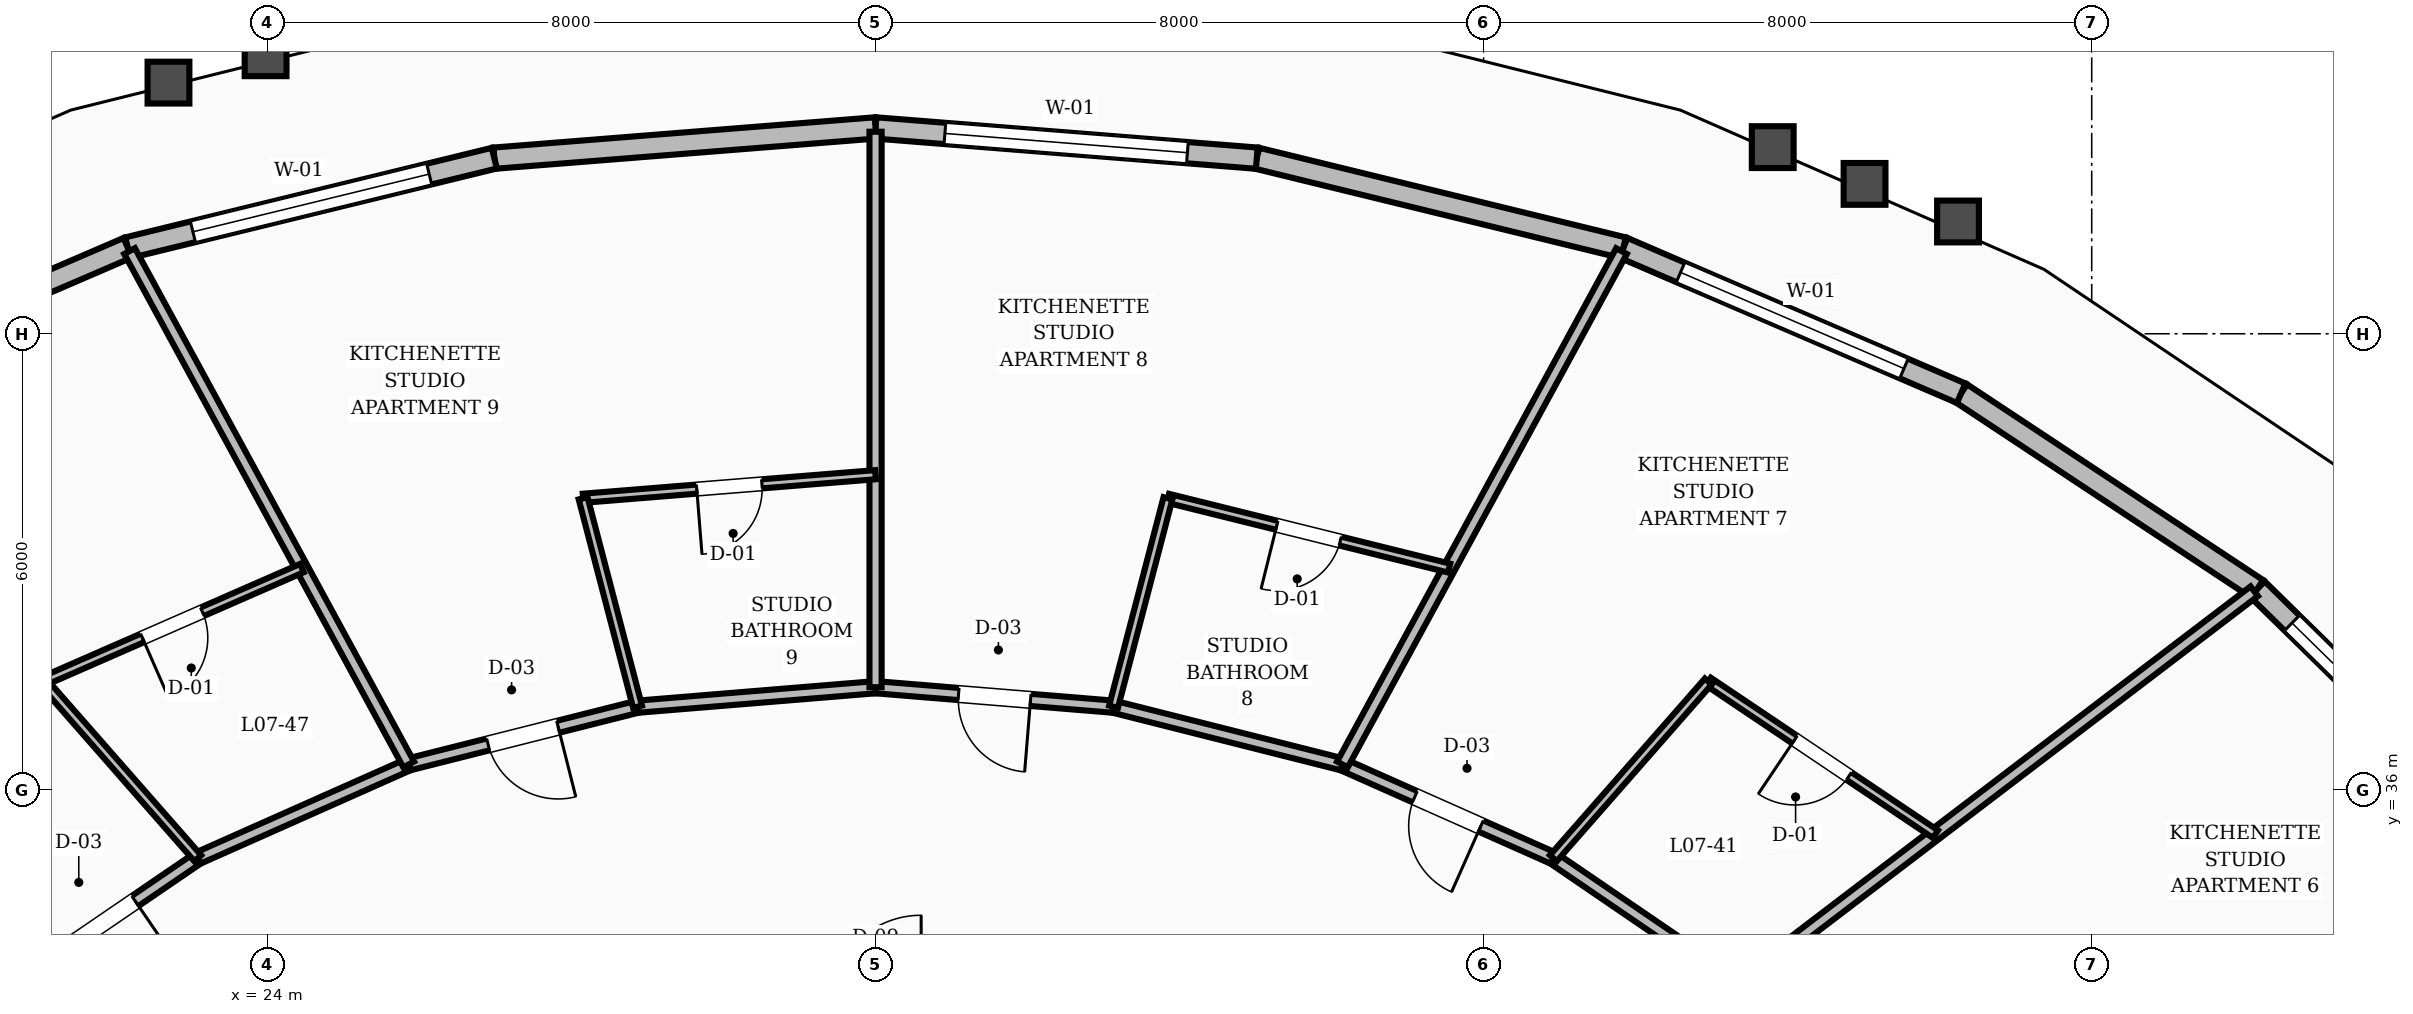
"""IFC4 building model, lengths in metres.
Left out: names, types, materials, properties, quantities, classifications, styles, units other than length and angle.
Written with IfcOpenShell. Run it as: python <this file> out.ifc"""

import sys

from ifc_helpers import new_model, si_unit, direction, frame, frame_2d, origin, place, context, subcontext, project, spatial, rectangle, extrude, element, fill, save


model = new_model("IFC4")
c1 = context("Model", 3, precision=1e-05, world=origin(), true_north=direction((0.0, 1.0)))
c2 = subcontext(c1, "Body", "Model", "MODEL_VIEW")
j1 = project(units=[si_unit("LENGTHUNIT", "METRE"), si_unit("PLANEANGLEUNIT", "RADIAN")], contexts=[c1])
p1 = place(None, origin())
s1 = spatial("IfcSite", under=j1, at=p1, CompositionType="ELEMENT")
p2 = place(p1, origin())
s2 = spatial("IfcBuilding", under=s1, at=p2, CompositionType="ELEMENT")
p3 = place(p2, frame((0.0, 0.0, 34.0)))
s3 = spatial("IfcBuildingStorey", under=s2, at=p3, CompositionType="ELEMENT", Elevation=34.0)
p4 = place(p3, frame((53.375, 35.505, 0.0), z_axis=(0.0, 0.0, 1.0), x_axis=(-0.713670465871, 0.700481595864, 0.0)))
e1 = element("IfcWall", 1, at=p4, inside=s3, PredefinedType="STANDARD", context=c2, shape_type="SweptSolid", body=[
    extrude(rectangle(XDim=4.48, YDim=0.28, at=frame_2d((2.24, 0.0))), origin(), (0.0, 0.0, 1.0), 2.65),
])
p5 = place(p4, frame((0.64, 0.0, 0.8)))
e2 = element("IfcOpeningElement", 2, at=p5, cuts=e1, PredefinedType="OPENING", context=c2, shape_type="SweptSolid", body=[
    extrude(rectangle(XDim=3.2, YDim=1.65, at=frame_2d((1.6, 0.825))), frame((0.0, 0.15, 0.0), z_axis=(0.0, -1.0, 0.0), x_axis=(1.0, 0.0, 0.0)), (0.0, 0.0, 1.0), 0.3),
])
p6 = place(p3, frame((50.178, 38.643, 0.0), z_axis=(0.0, 0.0, 1.0), x_axis=(-0.834191456714, 0.551474943716, 0.0)))
e3 = element("IfcWall", 3, at=p6, inside=s3, PredefinedType="STANDARD", context=c2, shape_type="SweptSolid", body=[
    extrude(rectangle(XDim=4.67, YDim=0.28, at=frame_2d((2.335, 0.0))), origin(), (0.0, 0.0, 1.0), 2.65),
])
p7 = place(p3, frame((46.282, 41.218, 0.0), z_axis=(0.0, 0.0, 1.0), x_axis=(-0.918488745996, 0.395447118435, 0.0)))
e4 = element("IfcWall", 4, at=p7, inside=s3, PredefinedType="STANDARD", context=c2, shape_type="SweptSolid", body=[
    extrude(rectangle(XDim=4.839, YDim=0.28, at=frame_2d((2.419, 0.0))), origin(), (0.0, 0.0, 1.0), 2.65),
])
p8 = place(p7, frame((0.82, 0.0, 0.8)))
e5 = element("IfcOpeningElement", 5, at=p8, cuts=e4, PredefinedType="OPENING", context=c2, shape_type="SweptSolid", body=[
    extrude(rectangle(XDim=3.2, YDim=1.65, at=frame_2d((1.6, 0.825))), frame((0.0, 0.15, 0.0), z_axis=(0.0, -1.0, 0.0), x_axis=(1.0, 0.0, 0.0)), (0.0, 0.0, 1.0), 0.3),
])
p9 = place(p3, frame((41.838, 43.132, 0.0), z_axis=(0.0, 0.0, 1.0), x_axis=(-0.971416145281, 0.237382966297, 0.0)))
e6 = element("IfcWall", 6, at=p9, inside=s3, PredefinedType="STANDARD", context=c2, shape_type="SweptSolid", body=[
    extrude(rectangle(XDim=4.964, YDim=0.28, at=frame_2d((2.482, 0.0))), origin(), (0.0, 0.0, 1.0), 2.65),
])
p10 = place(p3, frame((37.015, 44.31, 0.0), z_axis=(0.0, 0.0, 1.0), x_axis=(-0.996866911104, 0.079097165219, 0.0)))
e7 = element("IfcWall", 7, at=p10, inside=s3, PredefinedType="STANDARD", context=c2, shape_type="SweptSolid", body=[
    extrude(rectangle(XDim=5.031, YDim=0.28, at=frame_2d((2.516, 0.0))), origin(), (0.0, 0.0, 1.0), 2.65),
])
p11 = place(p10, frame((0.916, 0.0, 0.8)))
e8 = element("IfcOpeningElement", 8, at=p11, cuts=e7, PredefinedType="OPENING", context=c2, shape_type="SweptSolid", body=[
    extrude(rectangle(XDim=3.2, YDim=1.65, at=frame_2d((1.6, 0.825))), frame((0.0, 0.15, 0.0), z_axis=(0.0, -1.0, 0.0), x_axis=(1.0, 0.0, 0.0)), (0.0, 0.0, 1.0), 0.3),
])
p12 = place(p3, frame((32.0, 44.708, 0.0), z_axis=(0.0, 0.0, 1.0), x_axis=(-0.996866911104, -0.079097165219, 0.0)))
e9 = element("IfcWall", 9, at=p12, inside=s3, PredefinedType="STANDARD", context=c2, shape_type="SweptSolid", body=[
    extrude(rectangle(XDim=5.031, YDim=0.28, at=frame_2d((2.516, 0.0))), origin(), (0.0, 0.0, 1.0), 2.65),
])
p13 = place(p3, frame((26.985, 44.31, 0.0), z_axis=(0.0, 0.0, 1.0), x_axis=(-0.971416145281, -0.237382966297, 0.0)))
e10 = element("IfcWall", 10, at=p13, inside=s3, PredefinedType="STANDARD", context=c2, shape_type="SweptSolid", body=[
    extrude(rectangle(XDim=4.964, YDim=0.28, at=frame_2d((2.482, 0.0))), origin(), (0.0, 0.0, 1.0), 2.65),
])
p14 = place(p13, frame((0.882, 0.0, 0.8)))
e11 = element("IfcOpeningElement", 11, at=p14, cuts=e10, PredefinedType="OPENING", context=c2, shape_type="SweptSolid", body=[
    extrude(rectangle(XDim=3.2, YDim=1.65, at=frame_2d((1.6, 0.825))), frame((0.0, 0.15, 0.0), z_axis=(0.0, -1.0, 0.0), x_axis=(1.0, 0.0, 0.0)), (0.0, 0.0, 1.0), 0.3),
])
p15 = place(p3, frame((22.162, 43.132, 0.0), z_axis=(0.0, 0.0, 1.0), x_axis=(-0.918488745996, -0.395447118435, 0.0)))
e12 = element("IfcWall", 12, at=p15, inside=s3, PredefinedType="STANDARD", context=c2, shape_type="SweptSolid", body=[
    extrude(rectangle(XDim=4.839, YDim=0.28, at=frame_2d((2.419, 0.0))), origin(), (0.0, 0.0, 1.0), 2.65),
])
p16 = place(p3, frame((43.349, 33.44, 0.0), z_axis=(0.0, 0.0, 1.0), x_axis=(-0.825929039072, 0.563774088104, 0.0)))
e13 = element("IfcWall", 13, at=p16, inside=s3, PredefinedType="SOLIDWALL", context=c2, shape_type="SweptSolid", body=[
    extrude(rectangle(XDim=2.945, YDim=0.16, at=frame_2d((1.472, 0.0))), origin(), (0.0, 0.0, 1.0), 2.61),
])
p17 = place(p3, frame((40.917, 35.1, 0.0), z_axis=(0.0, 0.0, 1.0), x_axis=(-0.913768445178, 0.406235434936, 0.0)))
e14 = element("IfcWall", 14, at=p17, inside=s3, PredefinedType="SOLIDWALL", context=c2, shape_type="SweptSolid", body=[
    extrude(rectangle(XDim=3.037, YDim=0.16, at=frame_2d((1.519, 0.0))), origin(), (0.0, 0.0, 1.0), 2.61),
])
p18 = place(p17, frame((1.043, 0.0, 0.0)))
e15 = element("IfcOpeningElement", 15, at=p18, cuts=e14, PredefinedType="OPENING", context=c2, shape_type="SweptSolid", body=[
    extrude(rectangle(XDim=0.95, YDim=2.1, at=frame_2d((0.475, 1.05))), frame((0.0, 0.09, 0.0), z_axis=(0.0, -1.0, 0.0), x_axis=(1.0, 0.0, 0.0)), (0.0, 0.0, 1.0), 0.18),
])
p19 = place(p3, frame((38.142, 36.334, 0.0), z_axis=(0.0, 0.0, 1.0), x_axis=(-0.969608333194, 0.244662380029, 0.0)))
e16 = element("IfcWall", 16, at=p19, inside=s3, PredefinedType="SOLIDWALL", context=c2, shape_type="SweptSolid", body=[
    extrude(rectangle(XDim=3.105, YDim=0.16, at=frame_2d((1.553, 0.0))), origin(), (0.0, 0.0, 1.0), 2.61),
])
p20 = place(p3, frame((35.131, 37.094, 0.0), z_axis=(0.0, 0.0, 1.0), x_axis=(-0.996658973252, 0.081675522876, 0.0)))
e17 = element("IfcWall", 17, at=p20, inside=s3, PredefinedType="SOLIDWALL", context=c2, shape_type="SweptSolid", body=[
    extrude(rectangle(XDim=3.142, YDim=0.16, at=frame_2d((1.571, 0.0))), origin(), (0.0, 0.0, 1.0), 2.61),
])
p21 = place(p20, frame((1.096, 0.0, 0.0)))
e18 = element("IfcOpeningElement", 18, at=p21, cuts=e17, PredefinedType="OPENING", context=c2, shape_type="SweptSolid", body=[
    extrude(rectangle(XDim=0.95, YDim=2.1, at=frame_2d((0.475, 1.05))), frame((0.0, 0.09, 0.0), z_axis=(0.0, -1.0, 0.0), x_axis=(1.0, 0.0, 0.0)), (0.0, 0.0, 1.0), 0.18),
])
p22 = place(p3, frame((32.0, 37.35, 0.0), z_axis=(0.0, 0.0, 1.0), x_axis=(-0.996658973252, -0.081675522876, 0.0)))
e19 = element("IfcWall", 19, at=p22, inside=s3, PredefinedType="SOLIDWALL", context=c2, shape_type="SweptSolid", body=[
    extrude(rectangle(XDim=3.142, YDim=0.16, at=frame_2d((1.571, 0.0))), origin(), (0.0, 0.0, 1.0), 2.61),
])
p23 = place(p3, frame((28.869, 37.094, 0.0), z_axis=(0.0, 0.0, 1.0), x_axis=(-0.969608333194, -0.244662380029, 0.0)))
e20 = element("IfcWall", 20, at=p23, inside=s3, PredefinedType="SOLIDWALL", context=c2, shape_type="SweptSolid", body=[
    extrude(rectangle(XDim=3.105, YDim=0.16, at=frame_2d((1.553, 0.0))), origin(), (0.0, 0.0, 1.0), 2.61),
])
p24 = place(p23, frame((1.078, 0.0, 0.0)))
e21 = element("IfcOpeningElement", 21, at=p24, cuts=e20, PredefinedType="OPENING", context=c2, shape_type="SweptSolid", body=[
    extrude(rectangle(XDim=0.95, YDim=2.1, at=frame_2d((0.475, 1.05))), frame((0.0, 0.09, 0.0), z_axis=(0.0, -1.0, 0.0), x_axis=(1.0, 0.0, 0.0)), (0.0, 0.0, 1.0), 0.18),
])
p25 = place(p3, frame((25.858, 36.334, 0.0), z_axis=(0.0, 0.0, 1.0), x_axis=(-0.913768445178, -0.406235434936, 0.0)))
e22 = element("IfcWall", 22, at=p25, inside=s3, PredefinedType="SOLIDWALL", context=c2, shape_type="SweptSolid", body=[
    extrude(rectangle(XDim=3.037, YDim=0.16, at=frame_2d((1.519, 0.0))), origin(), (0.0, 0.0, 1.0), 2.61),
])
p26 = place(p3, frame((23.083, 35.1, 0.0), z_axis=(0.0, 0.0, 1.0), x_axis=(-0.825929039072, -0.563774088104, 0.0)))
e23 = element("IfcWall", 23, at=p26, inside=s3, PredefinedType="SOLIDWALL", context=c2, shape_type="SweptSolid", body=[
    extrude(rectangle(XDim=2.945, YDim=0.16, at=frame_2d((1.472, 0.0))), origin(), (0.0, 0.0, 1.0), 2.61),
])
p27 = place(p26, frame((0.997, 0.0, 0.0)))
e24 = element("IfcOpeningElement", 24, at=p27, cuts=e23, PredefinedType="OPENING", context=c2, shape_type="SweptSolid", body=[
    extrude(rectangle(XDim=0.95, YDim=2.1, at=frame_2d((0.475, 1.05))), frame((0.0, 0.09, 0.0), z_axis=(0.0, -1.0, 0.0), x_axis=(1.0, 0.0, 0.0)), (0.0, 0.0, 1.0), 0.18),
])
p28 = place(p3, frame((43.349, 33.44, 0.0), z_axis=(0.0, 0.0, 1.0), x_axis=(0.795456671163, 0.606010465506, 0.0)))
e25 = element("IfcWall", 25, at=p28, inside=s3, PredefinedType="SOLIDWALL", context=c2, shape_type="SweptSolid", body=[
    extrude(rectangle(XDim=8.535, YDim=0.16, at=frame_2d((4.268, 0.0))), origin(), (0.0, 0.0, 1.0), 2.61),
])
p29 = place(p3, frame((45.944, 35.417, 0.0), z_axis=(0.0, 0.0, 1.0), x_axis=(-0.830041751771, 0.557701255438, 0.0)))
e26 = element("IfcWall", 26, at=p29, inside=s3, PredefinedType="PARTITIONING", context=c2, shape_type="SweptSolid", body=[
    extrude(rectangle(XDim=3.6, YDim=0.12, at=frame_2d((1.8, 0.0))), origin(), (0.0, 0.0, 1.0), 2.61),
])
p30 = place(p29, frame((1.37, 0.0, 0.0)))
e27 = element("IfcOpeningElement", 27, at=p30, cuts=e26, PredefinedType="OPENING", context=c2, shape_type="SweptSolid", body=[
    extrude(rectangle(XDim=0.86, YDim=2.1, at=frame_2d((0.43, 1.05))), frame((0.0, 0.07, 0.0), z_axis=(0.0, -1.0, 0.0), x_axis=(1.0, 0.0, 0.0)), (0.0, 0.0, 1.0), 0.14),
])
p31 = place(p3, frame((40.917, 35.1, 0.0), z_axis=(0.0, 0.0, 1.0), x_axis=(0.659365011607, 0.751822972161, 0.0)))
e28 = element("IfcWall", 28, at=p31, inside=s3, PredefinedType="PARTITIONING", context=c2, shape_type="SweptSolid", body=[
    extrude(rectangle(XDim=3.092, YDim=0.12, at=frame_2d((1.546, 0.0))), origin(), (0.0, 0.0, 1.0), 2.61),
])
p32 = place(p3, frame((38.142, 36.334, 0.0), z_axis=(0.0, 0.0, 1.0), x_axis=(0.477665740343, 0.878541655531, 0.0)))
e29 = element("IfcWall", 29, at=p32, inside=s3, PredefinedType="SOLIDWALL", context=c2, shape_type="SweptSolid", body=[
    extrude(rectangle(XDim=7.688, YDim=0.16, at=frame_2d((3.844, 0.0))), origin(), (0.0, 0.0, 1.0), 2.61),
])
p33 = place(p3, frame((39.546, 38.917, 0.0), z_axis=(0.0, 0.0, 1.0), x_axis=(-0.970518106829, 0.241028223073, 0.0)))
e30 = element("IfcWall", 30, at=p33, inside=s3, PredefinedType="PARTITIONING", context=c2, shape_type="SweptSolid", body=[
    extrude(rectangle(XDim=3.812, YDim=0.12, at=frame_2d((1.906, 0.0))), origin(), (0.0, 0.0, 1.0), 2.61),
])
p34 = place(p33, frame((1.476, 0.0, 0.0)))
e31 = element("IfcOpeningElement", 31, at=p34, cuts=e30, PredefinedType="OPENING", context=c2, shape_type="SweptSolid", body=[
    extrude(rectangle(XDim=0.86, YDim=2.1, at=frame_2d((0.43, 1.05))), frame((0.0, 0.07, 0.0), z_axis=(0.0, -1.0, 0.0), x_axis=(1.0, 0.0, 0.0)), (0.0, 0.0, 1.0), 0.14),
])
p35 = place(p3, frame((35.131, 37.094, 0.0), z_axis=(0.0, 0.0, 1.0), x_axis=(0.252656838481, 0.967555952888, 0.0)))
e32 = element("IfcWall", 32, at=p35, inside=s3, PredefinedType="PARTITIONING", context=c2, shape_type="SweptSolid", body=[
    extrude(rectangle(XDim=2.834, YDim=0.12, at=frame_2d((1.417, 0.0))), origin(), (0.0, 0.0, 1.0), 2.61),
])
p36 = place(p3, frame((32.0, 37.35, 0.0), z_axis=(0.0, 0.0, 1.0), x_axis=(0.0, 1.0, 0.0)))
e33 = element("IfcWall", 33, at=p36, inside=s3, PredefinedType="SOLIDWALL", context=c2, shape_type="SweptSolid", body=[
    extrude(rectangle(XDim=7.308, YDim=0.16, at=frame_2d((3.654, 0.0))), origin(), (0.0, 0.0, 1.0), 2.61),
])
p37 = place(p3, frame((32.0, 40.146, 0.0), z_axis=(0.0, 0.0, 1.0), x_axis=(-0.996762973996, -0.080396353595, 0.0)))
e34 = element("IfcWall", 34, at=p37, inside=s3, PredefinedType="PARTITIONING", context=c2, shape_type="SweptSolid", body=[
    extrude(rectangle(XDim=3.86, YDim=0.12, at=frame_2d((1.93, 0.0))), origin(), (0.0, 0.0, 1.0), 2.61),
])
p38 = place(p37, frame((1.5, 0.0, 0.0)))
e35 = element("IfcOpeningElement", 35, at=p38, cuts=e34, PredefinedType="OPENING", context=c2, shape_type="SweptSolid", body=[
    extrude(rectangle(XDim=0.86, YDim=2.1, at=frame_2d((0.43, 1.05))), frame((0.0, 0.07, 0.0), z_axis=(0.0, -1.0, 0.0), x_axis=(1.0, 0.0, 0.0)), (0.0, 0.0, 1.0), 0.14),
])
p39 = place(p3, frame((28.869, 37.094, 0.0), z_axis=(0.0, 0.0, 1.0), x_axis=(-0.252656838481, 0.967555952888, 0.0)))
e36 = element("IfcWall", 36, at=p39, inside=s3, PredefinedType="PARTITIONING", context=c2, shape_type="SweptSolid", body=[
    extrude(rectangle(XDim=2.834, YDim=0.12, at=frame_2d((1.417, 0.0))), origin(), (0.0, 0.0, 1.0), 2.61),
])
p40 = place(p3, frame((25.858, 36.334, 0.0), z_axis=(0.0, 0.0, 1.0), x_axis=(-0.477665740343, 0.878541655531, 0.0)))
e37 = element("IfcWall", 37, at=p40, inside=s3, PredefinedType="SOLIDWALL", context=c2, shape_type="SweptSolid", body=[
    extrude(rectangle(XDim=7.688, YDim=0.16, at=frame_2d((3.844, 0.0))), origin(), (0.0, 0.0, 1.0), 2.61),
])
p41 = place(p3, frame((24.454, 38.917, 0.0), z_axis=(0.0, 0.0, 1.0), x_axis=(-0.916101619969, -0.400946158342, 0.0)))
e38 = element("IfcWall", 38, at=p41, inside=s3, PredefinedType="PARTITIONING", context=c2, shape_type="SweptSolid", body=[
    extrude(rectangle(XDim=3.722, YDim=0.12, at=frame_2d((1.861, 0.0))), origin(), (0.0, 0.0, 1.0), 2.61),
])
p42 = place(p41, frame((1.431, 0.0, 0.0)))
e39 = element("IfcOpeningElement", 39, at=p42, cuts=e38, PredefinedType="OPENING", context=c2, shape_type="SweptSolid", body=[
    extrude(rectangle(XDim=0.86, YDim=2.1, at=frame_2d((0.43, 1.05))), frame((0.0, 0.07, 0.0), z_axis=(0.0, -1.0, 0.0), x_axis=(1.0, 0.0, 0.0)), (0.0, 0.0, 1.0), 0.14),
])
p43 = place(p3, frame((23.083, 35.1, 0.0), z_axis=(0.0, 0.0, 1.0), x_axis=(-0.659365011607, 0.751822972161, 0.0)))
e40 = element("IfcWall", 40, at=p43, inside=s3, PredefinedType="PARTITIONING", context=c2, shape_type="SweptSolid", body=[
    extrude(rectangle(XDim=3.092, YDim=0.12, at=frame_2d((1.546, 0.0))), origin(), (0.0, 0.0, 1.0), 2.61),
])
p44 = place(p5, origin())
e41 = element("IfcWindow", 41, at=p44, inside=s3, PartitioningType="SINGLE_PANEL", PredefinedType="WINDOW", context=c2, shape_type="SweptSolid", body=[
    extrude(rectangle(XDim=3.2, YDim=1.65, at=frame_2d((1.6, 0.825))), frame((0.0, 0.03, 0.0), z_axis=(0.0, -1.0, 0.0), x_axis=(1.0, 0.0, 0.0)), (0.0, 0.0, 1.0), 0.06),
])
fill(e2, e41)
p45 = place(p8, origin())
e42 = element("IfcWindow", 42, at=p45, inside=s3, PartitioningType="SINGLE_PANEL", PredefinedType="WINDOW", context=c2, shape_type="SweptSolid", body=[
    extrude(rectangle(XDim=3.2, YDim=1.65, at=frame_2d((1.6, 0.825))), frame((0.0, 0.03, 0.0), z_axis=(0.0, -1.0, 0.0), x_axis=(1.0, 0.0, 0.0)), (0.0, 0.0, 1.0), 0.06),
])
fill(e5, e42)
p46 = place(p11, origin())
e43 = element("IfcWindow", 43, at=p46, inside=s3, PartitioningType="SINGLE_PANEL", PredefinedType="WINDOW", context=c2, shape_type="SweptSolid", body=[
    extrude(rectangle(XDim=3.2, YDim=1.65, at=frame_2d((1.6, 0.825))), frame((0.0, 0.03, 0.0), z_axis=(0.0, -1.0, 0.0), x_axis=(1.0, 0.0, 0.0)), (0.0, 0.0, 1.0), 0.06),
])
fill(e8, e43)
p47 = place(p14, origin())
e44 = element("IfcWindow", 44, at=p47, inside=s3, PartitioningType="SINGLE_PANEL", PredefinedType="WINDOW", context=c2, shape_type="SweptSolid", body=[
    extrude(rectangle(XDim=3.2, YDim=1.65, at=frame_2d((1.6, 0.825))), frame((0.0, 0.03, 0.0), z_axis=(0.0, -1.0, 0.0), x_axis=(1.0, 0.0, 0.0)), (0.0, 0.0, 1.0), 0.06),
])
fill(e11, e44)
p48 = place(p30, origin())
e45 = element("IfcDoor", 45, at=p48, inside=s3, OperationType="SINGLE_SWING_RIGHT", PredefinedType="DOOR", context=c2, shape_type="SweptSolid", body=[
    extrude(rectangle(XDim=0.86, YDim=2.1, at=frame_2d((0.43, 1.05))), frame((0.0, 0.025, 0.0), z_axis=(0.0, -1.0, 0.0), x_axis=(1.0, 0.0, 0.0)), (0.0, 0.0, 1.0), 0.05),
])
fill(e27, e45)
p49 = place(p18, origin())
e46 = element("IfcDoor", 46, at=p49, inside=s3, OperationType="SINGLE_SWING_LEFT", PredefinedType="DOOR", context=c2, shape_type="SweptSolid", body=[
    extrude(rectangle(XDim=0.95, YDim=2.1, at=frame_2d((0.475, 1.05))), frame((0.0, 0.025, 0.0), z_axis=(0.0, -1.0, 0.0), x_axis=(1.0, 0.0, 0.0)), (0.0, 0.0, 1.0), 0.05),
])
fill(e15, e46)
p50 = place(p34, origin())
e47 = element("IfcDoor", 47, at=p50, inside=s3, OperationType="SINGLE_SWING_RIGHT", PredefinedType="DOOR", context=c2, shape_type="SweptSolid", body=[
    extrude(rectangle(XDim=0.86, YDim=2.1, at=frame_2d((0.43, 1.05))), frame((0.0, 0.025, 0.0), z_axis=(0.0, -1.0, 0.0), x_axis=(1.0, 0.0, 0.0)), (0.0, 0.0, 1.0), 0.05),
])
fill(e31, e47)
p51 = place(p21, origin())
e48 = element("IfcDoor", 48, at=p51, inside=s3, OperationType="SINGLE_SWING_LEFT", PredefinedType="DOOR", context=c2, shape_type="SweptSolid", body=[
    extrude(rectangle(XDim=0.95, YDim=2.1, at=frame_2d((0.475, 1.05))), frame((0.0, 0.025, 0.0), z_axis=(0.0, -1.0, 0.0), x_axis=(1.0, 0.0, 0.0)), (0.0, 0.0, 1.0), 0.05),
])
fill(e18, e48)
p52 = place(p38, origin())
e49 = element("IfcDoor", 49, at=p52, inside=s3, OperationType="SINGLE_SWING_RIGHT", PredefinedType="DOOR", context=c2, shape_type="SweptSolid", body=[
    extrude(rectangle(XDim=0.86, YDim=2.1, at=frame_2d((0.43, 1.05))), frame((0.0, 0.025, 0.0), z_axis=(0.0, -1.0, 0.0), x_axis=(1.0, 0.0, 0.0)), (0.0, 0.0, 1.0), 0.05),
])
fill(e35, e49)
p53 = place(p24, origin())
e50 = element("IfcDoor", 50, at=p53, inside=s3, OperationType="SINGLE_SWING_LEFT", PredefinedType="DOOR", context=c2, shape_type="SweptSolid", body=[
    extrude(rectangle(XDim=0.95, YDim=2.1, at=frame_2d((0.475, 1.05))), frame((0.0, 0.025, 0.0), z_axis=(0.0, -1.0, 0.0), x_axis=(1.0, 0.0, 0.0)), (0.0, 0.0, 1.0), 0.05),
])
fill(e21, e50)
p54 = place(p42, origin())
e51 = element("IfcDoor", 51, at=p54, inside=s3, OperationType="SINGLE_SWING_RIGHT", PredefinedType="DOOR", context=c2, shape_type="SweptSolid", body=[
    extrude(rectangle(XDim=0.86, YDim=2.1, at=frame_2d((0.43, 1.05))), frame((0.0, 0.025, 0.0), z_axis=(0.0, -1.0, 0.0), x_axis=(1.0, 0.0, 0.0)), (0.0, 0.0, 1.0), 0.05),
])
fill(e39, e51)
p55 = place(p27, origin())
e52 = element("IfcDoor", 52, at=p55, inside=s3, OperationType="SINGLE_SWING_LEFT", PredefinedType="DOOR", context=c2, shape_type="SweptSolid", body=[
    extrude(rectangle(XDim=0.95, YDim=2.1, at=frame_2d((0.475, 1.05))), frame((0.0, 0.025, 0.0), z_axis=(0.0, -1.0, 0.0), x_axis=(1.0, 0.0, 0.0)), (0.0, 0.0, 1.0), 0.05),
])
fill(e24, e52)
save(model, sys.argv[1])
